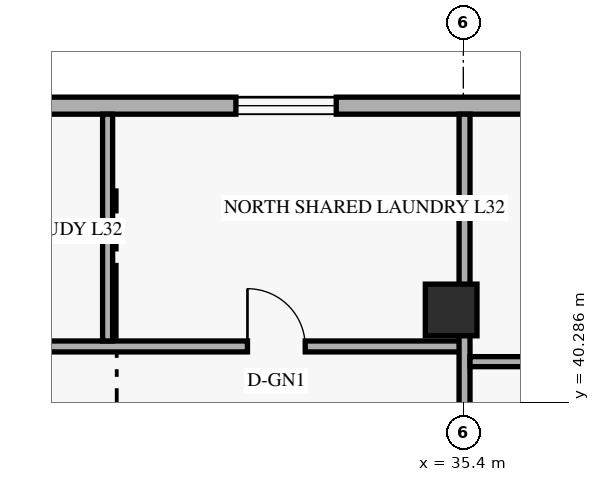
"""IFC4 building model, lengths in metres.
Left out: names, types, materials, properties, quantities, classifications, styles, units other than length and angle.
Written with IfcOpenShell. Run it as: python <this file> out.ifc"""

import sys

from ifc_helpers import new_model, si_unit, direction, frame, frame_2d, origin, origin_2d, place, context, subcontext, project, spatial, rectangle, extrude, element, fill, save


model = new_model("IFC4")
c1 = context("Model", 3, precision=1e-05, world=origin(), true_north=direction((0.0, 1.0)))
c2 = subcontext(c1, "Body", "Model", "MODEL_VIEW")
j1 = project(units=[si_unit("LENGTHUNIT", "METRE"), si_unit("PLANEANGLEUNIT", "RADIAN")], contexts=[c1])
p1 = place(None, origin())
s1 = spatial("IfcSite", under=j1, at=p1, CompositionType="ELEMENT")
p2 = place(p1, origin())
s2 = spatial("IfcBuilding", under=s1, at=p2, CompositionType="ELEMENT")
p3 = place(p2, frame((0.0, 0.0, 124.8)))
s3 = spatial("IfcBuildingStorey", under=s2, at=p3, CompositionType="ELEMENT", Elevation=124.8)
p4 = place(p3, frame((35.2, 41.8, 0.0), z_axis=(0.0, 0.0, 1.0), x_axis=(1.0, 0.0, 0.0)))
e1 = element("IfcColumn", 1, at=p4, inside=s3, PredefinedType="COLUMN", context=c2, shape_type="SweptSolid", body=[
    extrude(rectangle(XDim=0.85, YDim=0.85, at=origin_2d()), origin(), (0.0, 0.0, 1.0), 3.6),
])
p5 = place(p3, frame((49.98, 45.16, 0.0), z_axis=(0.0, 0.0, 1.0), x_axis=(-1.0, 0.0, 0.0)))
e2 = element("IfcWall", 2, at=p5, inside=s3, PredefinedType="SOLIDWALL", context=c2, shape_type="SweptSolid", body=[
    extrude(rectangle(XDim=36.56, YDim=0.28, at=frame_2d((18.28, 0.0))), origin(), (0.0, 0.0, 1.0), 3.36),
])
p6 = place(p5, frame((31.62, 0.0, 0.85)))
e3 = element("IfcOpeningElement", 3, at=p6, cuts=e2, PredefinedType="OPENING", context=c2, shape_type="SweptSolid", body=[
    extrude(rectangle(XDim=1.65, YDim=1.6, at=frame_2d((0.825, 0.8))), frame((0.0, 0.15, 0.0), z_axis=(0.0, -1.0, 0.0), x_axis=(1.0, 0.0, 0.0)), (0.0, 0.0, 1.0), 0.3),
])
p7 = place(p5, frame((23.555, 0.0, 0.85)))
e4 = element("IfcOpeningElement", 4, at=p7, cuts=e2, PredefinedType="OPENING", context=c2, shape_type="SweptSolid", body=[
    extrude(rectangle(XDim=1.65, YDim=1.6, at=frame_2d((0.825, 0.8))), frame((0.0, 0.15, 0.0), z_axis=(0.0, -1.0, 0.0), x_axis=(1.0, 0.0, 0.0)), (0.0, 0.0, 1.0), 0.3),
])
p8 = place(p5, frame((16.67, 0.0, 0.85)))
e5 = element("IfcOpeningElement", 5, at=p8, cuts=e2, PredefinedType="OPENING", context=c2, shape_type="SweptSolid", body=[
    extrude(rectangle(XDim=1.65, YDim=1.6, at=frame_2d((0.825, 0.8))), frame((0.0, 0.15, 0.0), z_axis=(0.0, -1.0, 0.0), x_axis=(1.0, 0.0, 0.0)), (0.0, 0.0, 1.0), 0.3),
])
p9 = place(p5, frame((10.44, 0.0, 0.85)))
e6 = element("IfcOpeningElement", 6, at=p9, cuts=e2, PredefinedType="OPENING", context=c2, shape_type="SweptSolid", body=[
    extrude(rectangle(XDim=1.65, YDim=1.6, at=frame_2d((0.825, 0.8))), frame((0.0, 0.15, 0.0), z_axis=(0.0, -1.0, 0.0), x_axis=(1.0, 0.0, 0.0)), (0.0, 0.0, 1.0), 0.3),
])
p10 = place(p5, frame((4.65, 0.0, 0.85)))
e7 = element("IfcOpeningElement", 7, at=p10, cuts=e2, PredefinedType="OPENING", context=c2, shape_type="SweptSolid", body=[
    extrude(rectangle(XDim=1.65, YDim=1.6, at=frame_2d((0.825, 0.8))), frame((0.0, 0.15, 0.0), z_axis=(0.0, -1.0, 0.0), x_axis=(1.0, 0.0, 0.0)), (0.0, 0.0, 1.0), 0.3),
])
p11 = place(p5, frame((0.665, 0.0, 0.85)))
e8 = element("IfcOpeningElement", 8, at=p11, cuts=e2, PredefinedType="OPENING", context=c2, shape_type="SweptSolid", body=[
    extrude(rectangle(XDim=1.65, YDim=1.6, at=frame_2d((0.825, 0.8))), frame((0.0, 0.15, 0.0), z_axis=(0.0, -1.0, 0.0), x_axis=(1.0, 0.0, 0.0)), (0.0, 0.0, 1.0), 0.3),
])
p12 = place(p3, frame((21.74, 41.2, 0.0), z_axis=(0.0, 0.0, 1.0), x_axis=(1.0, 0.0, 0.0)))
e9 = element("IfcWall", 9, at=p12, inside=s3, PredefinedType="STANDARD", context=c2, shape_type="SweptSolid", body=[
    extrude(rectangle(XDim=13.68, YDim=0.18, at=frame_2d((6.84, 0.0))), origin(), (0.0, 0.0, 1.0), 2.731),
])
p13 = place(p12, frame((3.09, 0.0, 0.0)))
e10 = element("IfcOpeningElement", 10, at=p13, cuts=e9, PredefinedType="OPENING", context=c2, shape_type="SweptSolid", body=[
    extrude(rectangle(XDim=0.95, YDim=2.15, at=frame_2d((0.475, 1.075))), frame((0.0, 0.1, 0.0), z_axis=(0.0, -1.0, 0.0), x_axis=(1.0, 0.0, 0.0)), (0.0, 0.0, 1.0), 0.2),
])
p14 = place(p12, frame((10.11, 0.0, 0.0)))
e11 = element("IfcOpeningElement", 11, at=p14, cuts=e9, PredefinedType="OPENING", context=c2, shape_type="SweptSolid", body=[
    extrude(rectangle(XDim=0.95, YDim=2.15, at=frame_2d((0.475, 1.075))), frame((0.0, 0.1, 0.0), z_axis=(0.0, -1.0, 0.0), x_axis=(1.0, 0.0, 0.0)), (0.0, 0.0, 1.0), 0.2),
])
p15 = place(p3, frame((35.42, 38.75, 0.0), z_axis=(0.0, 0.0, 1.0), x_axis=(0.0, 1.0, 0.0)))
e12 = element("IfcWall", 12, at=p15, inside=s3, PredefinedType="PARTITIONING", context=c2, shape_type="SweptSolid", body=[
    extrude(rectangle(XDim=6.27, YDim=0.18, at=frame_2d((3.135, 0.0))), origin(), (0.0, 0.0, 1.0), 2.731),
])
p16 = place(p3, frame((35.51, 40.95, 0.0), z_axis=(0.0, 0.0, 1.0), x_axis=(1.0, 0.0, 0.0)))
e13 = element("IfcWall", 13, at=p16, inside=s3, PredefinedType="PARTITIONING", context=c2, shape_type="SweptSolid", body=[
    extrude(rectangle(XDim=6.58, YDim=0.165, at=frame_2d((3.29, 0.0))), origin(), (0.0, 0.0, 1.0), 3.36),
])
p17 = place(p16, frame((2.655, 0.0, 0.0)))
e14 = element("IfcOpeningElement", 14, at=p17, cuts=e13, PredefinedType="OPENING", context=c2, shape_type="SweptSolid", body=[
    extrude(rectangle(XDim=0.95, YDim=2.15, at=frame_2d((0.475, 1.075))), frame((0.0, 0.093, 0.0), z_axis=(0.0, -1.0, 0.0), x_axis=(1.0, 0.0, 0.0)), (0.0, 0.0, 1.0), 0.185),
])
p18 = place(p3, frame((29.55, 41.29, 0.0), z_axis=(0.0, 0.0, 1.0), x_axis=(0.0, 1.0, 0.0)))
e15 = element("IfcWall", 15, at=p18, inside=s3, PredefinedType="PARTITIONING", context=c2, shape_type="SweptSolid", body=[
    extrude(rectangle(XDim=3.73, YDim=0.165, at=frame_2d((1.865, 0.0))), origin(), (0.0, 0.0, 1.0), 2.809),
])
p19 = place(p8, origin())
e16 = element("IfcWindow", 16, at=p19, inside=s3, PartitioningType="SINGLE_PANEL", PredefinedType="WINDOW", context=c2, shape_type="SweptSolid", body=[
    extrude(rectangle(XDim=1.65, YDim=1.6, at=frame_2d((0.825, 0.8))), frame((0.0, 0.03, 0.0), z_axis=(0.0, -1.0, 0.0), x_axis=(1.0, 0.0, 0.0)), (0.0, 0.0, 1.0), 0.06),
])
fill(e5, e16)
p20 = place(p14, origin())
e17 = element("IfcDoor", 17, at=p20, inside=s3, OperationType="SINGLE_SWING_LEFT", PredefinedType="DOOR", context=c2, shape_type="SweptSolid", body=[
    extrude(rectangle(XDim=0.95, YDim=2.15, at=frame_2d((0.475, 1.075))), frame((0.0, 0.025, 0.0), z_axis=(0.0, -1.0, 0.0), x_axis=(1.0, 0.0, 0.0)), (0.0, 0.0, 1.0), 0.05),
])
fill(e11, e17)
save(model, sys.argv[1])
